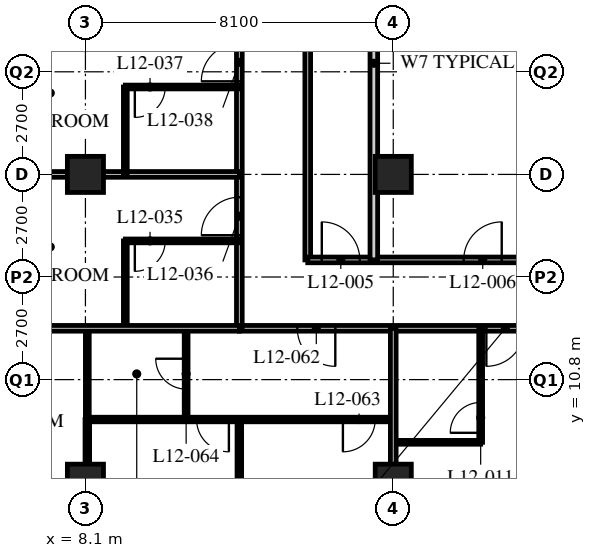
"""IFC4 building model, lengths in metres.
Left out: names, types, materials, properties, quantities, classifications, styles, units other than length and angle.
Written with IfcOpenShell. Run it as: python <this file> out.ifc"""

import sys

from ifc_helpers import new_model, si_unit, direction, frame, frame_2d, origin, origin_2d, place, context, subcontext, project, spatial, rectangle, hollow_rectangle, extrude, element, fill, save


model = new_model("IFC4")
c1 = context("Model", 3, precision=1e-05, world=origin(), true_north=direction((0.0, 1.0)))
c2 = subcontext(c1, "Body", "Model", "MODEL_VIEW")
j1 = project(units=[si_unit("LENGTHUNIT", "METRE"), si_unit("PLANEANGLEUNIT", "RADIAN")], contexts=[c1])
p1 = place(None, origin())
s1 = spatial("IfcSite", under=j1, at=p1, CompositionType="ELEMENT")
p2 = place(p1, origin())
s2 = spatial("IfcBuilding", under=s1, at=p2, CompositionType="ELEMENT")
p3 = place(p2, frame((0.0, 0.0, 53.4)))
s3 = spatial("IfcBuildingStorey", under=s2, at=p3, CompositionType="ELEMENT", Elevation=53.4)
for number, where, z_axis, x_axis in (
    (1, (8.1, 8.1, 0.0), (0.0, 0.0, 1.0), (1.0, 0.0, 0.0)),
    (2, (8.1, 16.2, 0.0), (0.0, 0.0, 1.0), (1.0, 0.0, 0.0)),
    (3, (16.2, 8.1, 0.0), (0.0, 0.0, 1.0), (1.0, 0.0, 0.0)),
    (4, (16.2, 16.2, 0.0), (0.0, 0.0, 1.0), (1.0, 0.0, 0.0)),
):
    element("IfcColumn", number, at=place(p3, frame(where, z_axis=z_axis, x_axis=x_axis)), inside=s3, PredefinedType="COLUMN", context=c2, shape_type="SweptSolid", body=[
        extrude(hollow_rectangle(XDim=0.95, YDim=0.95, WallThickness=0.095, at=origin_2d()), origin(), (0.0, 0.0, 1.0), 3.4),
    ])
p4 = place(p3, frame((12.15, 12.15, 0.0), z_axis=(0.0, 0.0, 1.0), x_axis=(1.0, 0.0, 0.0)))
e5 = element("IfcWall", 5, at=p4, inside=s3, PredefinedType="PARTITIONING", context=c2, shape_type="SweptSolid", body=[
    extrude(rectangle(XDim=32.4, YDim=0.15, at=frame_2d((16.2, 0.0))), origin(), (0.0, 0.0, 1.0), 3.19),
])
p5 = place(p4, frame((6.5, 0.0, 0.0)))
e6 = element("IfcOpeningElement", 6, at=p5, cuts=e5, PredefinedType="OPENING", context=c2, shape_type="SweptSolid", body=[
    extrude(rectangle(XDim=1.0, YDim=2.1, at=frame_2d((0.5, 1.05))), frame((0.0, 0.085, 0.0), z_axis=(0.0, -1.0, 0.0), x_axis=(1.0, 0.0, 0.0)), (0.0, 0.0, 1.0), 0.17),
])
p6 = place(p4, frame((8.4, 0.0, 0.0)))
e7 = element("IfcOpeningElement", 7, at=p6, cuts=e5, PredefinedType="OPENING", context=c2, shape_type="SweptSolid", body=[
    extrude(rectangle(XDim=1.0, YDim=2.1, at=frame_2d((0.5, 1.05))), frame((0.0, 0.085, 0.0), z_axis=(0.0, -1.0, 0.0), x_axis=(1.0, 0.0, 0.0)), (0.0, 0.0, 1.0), 0.17),
])
p7 = place(p4, frame((14.6, 0.0, 0.0)))
e8 = element("IfcOpeningElement", 8, at=p7, cuts=e5, PredefinedType="OPENING", context=c2, shape_type="SweptSolid", body=[
    extrude(rectangle(XDim=1.0, YDim=2.1, at=frame_2d((0.5, 1.05))), frame((0.0, 0.085, 0.0), z_axis=(0.0, -1.0, 0.0), x_axis=(1.0, 0.0, 0.0)), (0.0, 0.0, 1.0), 0.17),
])
p8 = place(p4, frame((18.65, 0.0, 0.0)))
e9 = element("IfcOpeningElement", 9, at=p8, cuts=e5, PredefinedType="OPENING", context=c2, shape_type="SweptSolid", body=[
    extrude(rectangle(XDim=1.0, YDim=2.1, at=frame_2d((0.5, 1.05))), frame((0.0, 0.085, 0.0), z_axis=(0.0, -1.0, 0.0), x_axis=(1.0, 0.0, 0.0)), (0.0, 0.0, 1.0), 0.17),
])
p9 = place(p4, frame((20.55, 0.0, 0.0)))
e10 = element("IfcOpeningElement", 10, at=p9, cuts=e5, PredefinedType="OPENING", context=c2, shape_type="SweptSolid", body=[
    extrude(rectangle(XDim=1.0, YDim=2.1, at=frame_2d((0.5, 1.05))), frame((0.0, 0.085, 0.0), z_axis=(0.0, -1.0, 0.0), x_axis=(1.0, 0.0, 0.0)), (0.0, 0.0, 1.0), 0.17),
])
p10 = place(p4, frame((26.75, 0.0, 0.0)))
e11 = element("IfcOpeningElement", 11, at=p10, cuts=e5, PredefinedType="OPENING", context=c2, shape_type="SweptSolid", body=[
    extrude(rectangle(XDim=1.0, YDim=2.1, at=frame_2d((0.5, 1.05))), frame((0.0, 0.085, 0.0), z_axis=(0.0, -1.0, 0.0), x_axis=(1.0, 0.0, 0.0)), (0.0, 0.0, 1.0), 0.17),
])
p11 = place(p4, frame((1.525, 0.0, 0.0)))
e12 = element("IfcOpeningElement", 12, at=p11, cuts=e5, PredefinedType="OPENING", context=c2, shape_type="SweptSolid", body=[
    extrude(rectangle(XDim=1.0, YDim=2.1, at=frame_2d((0.5, 1.05))), frame((0.0, 0.085, 0.0), z_axis=(0.0, -1.0, 0.0), x_axis=(1.0, 0.0, 0.0)), (0.0, 0.0, 1.0), 0.17),
])
p12 = place(p4, frame((29.875, 0.0, 0.0)))
e13 = element("IfcOpeningElement", 13, at=p12, cuts=e5, PredefinedType="OPENING", context=c2, shape_type="SweptSolid", body=[
    extrude(rectangle(XDim=1.0, YDim=2.1, at=frame_2d((0.5, 1.05))), frame((0.0, 0.085, 0.0), z_axis=(0.0, -1.0, 0.0), x_axis=(1.0, 0.0, 0.0)), (0.0, 0.0, 1.0), 0.17),
])
p13 = place(p3, frame((12.15, 12.15, 0.0), z_axis=(0.0, 0.0, 1.0), x_axis=(0.0, 1.0, 0.0)))
e14 = element("IfcWall", 14, at=p13, inside=s3, PredefinedType="PARTITIONING", context=c2, shape_type="SweptSolid", body=[
    extrude(rectangle(XDim=30.15, YDim=0.15, at=frame_2d((15.075, 0.0))), origin(), (0.0, 0.0, 1.0), 3.19),
])
p14 = place(p13, frame((2.45, 0.0, 0.0)))
e15 = element("IfcOpeningElement", 15, at=p14, cuts=e14, PredefinedType="OPENING", context=c2, shape_type="SweptSolid", body=[
    extrude(rectangle(XDim=1.0, YDim=2.1, at=frame_2d((0.5, 1.05))), frame((0.0, 0.085, 0.0), z_axis=(0.0, -1.0, 0.0), x_axis=(1.0, 0.0, 0.0)), (0.0, 0.0, 1.0), 0.17),
])
p15 = place(p13, frame((6.5, 0.0, 0.0)))
e16 = element("IfcOpeningElement", 16, at=p15, cuts=e14, PredefinedType="OPENING", context=c2, shape_type="SweptSolid", body=[
    extrude(rectangle(XDim=1.0, YDim=2.1, at=frame_2d((0.5, 1.05))), frame((0.0, 0.085, 0.0), z_axis=(0.0, -1.0, 0.0), x_axis=(1.0, 0.0, 0.0)), (0.0, 0.0, 1.0), 0.17),
])
p16 = place(p13, frame((10.55, 0.0, 0.0)))
e17 = element("IfcOpeningElement", 17, at=p16, cuts=e14, PredefinedType="OPENING", context=c2, shape_type="SweptSolid", body=[
    extrude(rectangle(XDim=1.0, YDim=2.1, at=frame_2d((0.5, 1.05))), frame((0.0, 0.085, 0.0), z_axis=(0.0, -1.0, 0.0), x_axis=(1.0, 0.0, 0.0)), (0.0, 0.0, 1.0), 0.17),
])
p17 = place(p13, frame((14.6, 0.0, 0.0)))
e18 = element("IfcOpeningElement", 18, at=p17, cuts=e14, PredefinedType="OPENING", context=c2, shape_type="SweptSolid", body=[
    extrude(rectangle(XDim=1.0, YDim=2.1, at=frame_2d((0.5, 1.05))), frame((0.0, 0.085, 0.0), z_axis=(0.0, -1.0, 0.0), x_axis=(1.0, 0.0, 0.0)), (0.0, 0.0, 1.0), 0.17),
])
p18 = place(p13, frame((21.65, 0.0, 0.0)))
e19 = element("IfcOpeningElement", 19, at=p18, cuts=e14, PredefinedType="OPENING", context=c2, shape_type="SweptSolid", body=[
    extrude(rectangle(XDim=1.0, YDim=2.1, at=frame_2d((0.5, 1.05))), frame((0.0, 0.085, 0.0), z_axis=(0.0, -1.0, 0.0), x_axis=(1.0, 0.0, 0.0)), (0.0, 0.0, 1.0), 0.17),
])
p19 = place(p13, frame((26.7, 0.0, 0.0)))
e20 = element("IfcOpeningElement", 20, at=p19, cuts=e14, PredefinedType="OPENING", context=c2, shape_type="SweptSolid", body=[
    extrude(rectangle(XDim=1.0, YDim=2.1, at=frame_2d((0.5, 1.05))), frame((0.0, 0.085, 0.0), z_axis=(0.0, -1.0, 0.0), x_axis=(1.0, 0.0, 0.0)), (0.0, 0.0, 1.0), 0.17),
])
p20 = place(p3, frame((13.95, 40.5, 0.0), z_axis=(0.0, 0.0, 1.0), x_axis=(0.0, -1.0, 0.0)))
e21 = element("IfcWall", 21, at=p20, inside=s3, PredefinedType="PARTITIONING", context=c2, shape_type="SweptSolid", body=[
    extrude(rectangle(XDim=26.55, YDim=0.15, at=frame_2d((13.275, 0.0))), origin(), (0.0, 0.0, 1.0), 3.19),
])
p21 = place(p20, frame((11.65, 0.0, 0.0)))
e22 = element("IfcOpeningElement", 22, at=p21, cuts=e21, PredefinedType="OPENING", context=c2, shape_type="SweptSolid", body=[
    extrude(rectangle(XDim=1.0, YDim=2.1, at=frame_2d((0.5, 1.05))), frame((0.0, 0.085, 0.0), z_axis=(0.0, -1.0, 0.0), x_axis=(1.0, 0.0, 0.0)), (0.0, 0.0, 1.0), 0.17),
])
p22 = place(p20, frame((3.55, 0.0, 0.0)))
e23 = element("IfcOpeningElement", 23, at=p22, cuts=e21, PredefinedType="OPENING", context=c2, shape_type="SweptSolid", body=[
    extrude(rectangle(XDim=1.0, YDim=2.1, at=frame_2d((0.5, 1.05))), frame((0.0, 0.085, 0.0), z_axis=(0.0, -1.0, 0.0), x_axis=(1.0, 0.0, 0.0)), (0.0, 0.0, 1.0), 0.17),
])
p23 = place(p3, frame((13.95, 13.95, 0.0), z_axis=(0.0, 0.0, 1.0), x_axis=(1.0, 0.0, 0.0)))
e24 = element("IfcWall", 24, at=p23, inside=s3, PredefinedType="PARTITIONING", context=c2, shape_type="SweptSolid", body=[
    extrude(rectangle(XDim=13.19, YDim=0.15, at=frame_2d((6.595, 0.0))), origin(), (0.0, 0.0, 1.0), 3.19),
])
p24 = place(p23, frame((0.37, 0.0, 0.0)))
e25 = element("IfcOpeningElement", 25, at=p24, cuts=e24, PredefinedType="OPENING", context=c2, shape_type="SweptSolid", body=[
    extrude(rectangle(XDim=1.0, YDim=2.1, at=frame_2d((0.5, 1.05))), frame((0.0, 0.085, 0.0), z_axis=(0.0, -1.0, 0.0), x_axis=(1.0, 0.0, 0.0)), (0.0, 0.0, 1.0), 0.17),
])
p25 = place(p23, frame((4.104, 0.0, 0.0)))
e26 = element("IfcOpeningElement", 26, at=p25, cuts=e24, PredefinedType="OPENING", context=c2, shape_type="SweptSolid", body=[
    extrude(rectangle(XDim=1.0, YDim=2.1, at=frame_2d((0.5, 1.05))), frame((0.0, 0.085, 0.0), z_axis=(0.0, -1.0, 0.0), x_axis=(1.0, 0.0, 0.0)), (0.0, 0.0, 1.0), 0.17),
])
p26 = place(p23, frame((9.835, 0.0, 0.0)))
e27 = element("IfcOpeningElement", 27, at=p26, cuts=e24, PredefinedType="OPENING", context=c2, shape_type="SweptSolid", body=[
    extrude(rectangle(XDim=1.0, YDim=2.1, at=frame_2d((0.5, 1.05))), frame((0.0, 0.085, 0.0), z_axis=(0.0, -1.0, 0.0), x_axis=(1.0, 0.0, 0.0)), (0.0, 0.0, 1.0), 0.17),
])
p27 = place(p3, frame((15.689, 13.95, 0.0), z_axis=(0.0, 0.0, 1.0), x_axis=(0.0, 1.0, 0.0)))
e28 = element("IfcWall", 28, at=p27, inside=s3, PredefinedType="SOLIDWALL", context=c2, shape_type="SweptSolid", body=[
    extrude(rectangle(XDim=10.35, YDim=0.2, at=frame_2d((5.175, 0.0))), origin(), (0.0, 0.0, 1.0), 3.19),
])
p28 = place(p3, frame((16.2, 9.15, 0.0), z_axis=(0.0, 0.0, 1.0), x_axis=(1.0, 0.0, 0.0)))
e29 = element("IfcWall", 29, at=p28, inside=s3, PredefinedType="PARTITIONING", context=c2, shape_type="SweptSolid", body=[
    extrude(rectangle(XDim=2.3, YDim=0.1, at=frame_2d((1.15, 0.0))), origin(), (0.0, 0.0, 1.0), 3.19),
])
p29 = place(p3, frame((18.5, 12.15, 0.0), z_axis=(0.0, 0.0, 1.0), x_axis=(0.0, -1.0, 0.0)))
e30 = element("IfcWall", 30, at=p29, inside=s3, PredefinedType="PARTITIONING", context=c2, shape_type="SweptSolid", body=[
    extrude(rectangle(XDim=3.0, YDim=0.1, at=frame_2d((1.5, 0.0))), origin(), (0.0, 0.0, 1.0), 3.19),
])
p30 = place(p29, frame((1.95, 0.0, 0.0)))
e31 = element("IfcOpeningElement", 31, at=p30, cuts=e30, PredefinedType="OPENING", context=c2, shape_type="SweptSolid", body=[
    extrude(rectangle(XDim=0.8, YDim=2.1, at=frame_2d((0.4, 1.05))), frame((0.0, 0.06, 0.0), z_axis=(0.0, -1.0, 0.0), x_axis=(1.0, 0.0, 0.0)), (0.0, 0.0, 1.0), 0.12),
])
p31 = place(p3, frame((9.15, 12.15, 0.0), z_axis=(0.0, 0.0, 1.0), x_axis=(0.0, 1.0, 0.0)))
e32 = element("IfcWall", 32, at=p31, inside=s3, PredefinedType="PARTITIONING", context=c2, shape_type="SweptSolid", body=[
    extrude(rectangle(XDim=2.3, YDim=0.1, at=frame_2d((1.15, 0.0))), origin(), (0.0, 0.0, 1.0), 3.19),
])
p32 = place(p3, frame((12.15, 14.45, 0.0), z_axis=(0.0, 0.0, 1.0), x_axis=(-1.0, 0.0, 0.0)))
e33 = element("IfcWall", 33, at=p32, inside=s3, PredefinedType="PARTITIONING", context=c2, shape_type="SweptSolid", body=[
    extrude(rectangle(XDim=3.0, YDim=0.1, at=frame_2d((1.5, 0.0))), origin(), (0.0, 0.0, 1.0), 3.19),
])
p33 = place(p32, frame((1.95, 0.0, 0.0)))
e34 = element("IfcOpeningElement", 34, at=p33, cuts=e33, PredefinedType="OPENING", context=c2, shape_type="SweptSolid", body=[
    extrude(rectangle(XDim=0.8, YDim=2.1, at=frame_2d((0.4, 1.05))), frame((0.0, 0.06, 0.0), z_axis=(0.0, -1.0, 0.0), x_axis=(1.0, 0.0, 0.0)), (0.0, 0.0, 1.0), 0.12),
])
p34 = place(p3, frame((12.15, 16.2, 0.0), z_axis=(0.0, 0.0, 1.0), x_axis=(-1.0, 0.0, 0.0)))
e35 = element("IfcWall", 35, at=p34, inside=s3, PredefinedType="PARTITIONING", context=c2, shape_type="SweptSolid", body=[
    extrude(rectangle(XDim=11.85, YDim=0.15, at=frame_2d((5.925, 0.0))), origin(), (0.0, 0.0, 1.0), 2.578),
])
p35 = place(p3, frame((9.15, 16.2, 0.0), z_axis=(0.0, 0.0, 1.0), x_axis=(0.0, 1.0, 0.0)))
e36 = element("IfcWall", 36, at=p35, inside=s3, PredefinedType="PARTITIONING", context=c2, shape_type="SweptSolid", body=[
    extrude(rectangle(XDim=2.3, YDim=0.1, at=frame_2d((1.15, 0.0))), origin(), (0.0, 0.0, 1.0), 3.19),
])
p36 = place(p3, frame((12.15, 18.5, 0.0), z_axis=(0.0, 0.0, 1.0), x_axis=(-1.0, 0.0, 0.0)))
e37 = element("IfcWall", 37, at=p36, inside=s3, PredefinedType="PARTITIONING", context=c2, shape_type="SweptSolid", body=[
    extrude(rectangle(XDim=3.0, YDim=0.1, at=frame_2d((1.5, 0.0))), origin(), (0.0, 0.0, 1.0), 3.19),
])
p37 = place(p36, frame((1.95, 0.0, 0.0)))
e38 = element("IfcOpeningElement", 38, at=p37, cuts=e37, PredefinedType="OPENING", context=c2, shape_type="SweptSolid", body=[
    extrude(rectangle(XDim=0.8, YDim=2.1, at=frame_2d((0.4, 1.05))), frame((0.0, 0.06, 0.0), z_axis=(0.0, -1.0, 0.0), x_axis=(1.0, 0.0, 0.0)), (0.0, 0.0, 1.0), 0.12),
])
p38 = place(p3, frame((10.75, 12.15, 0.0), z_axis=(0.0, 0.0, 1.0), x_axis=(0.0, -1.0, 0.0)))
e39 = element("IfcWall", 39, at=p38, inside=s3, PredefinedType="PARTITIONING", context=c2, shape_type="SweptSolid", body=[
    extrude(rectangle(XDim=2.4, YDim=0.1, at=frame_2d((1.2, 0.0))), origin(), (0.0, 0.0, 1.0), 3.19),
])
p39 = place(p38, frame((0.8, 0.0, 0.0)))
e40 = element("IfcOpeningElement", 40, at=p39, cuts=e39, PredefinedType="OPENING", context=c2, shape_type="SweptSolid", body=[
    extrude(rectangle(XDim=0.8, YDim=2.1, at=frame_2d((0.4, 1.05))), frame((0.0, 0.06, 0.0), z_axis=(0.0, -1.0, 0.0), x_axis=(1.0, 0.0, 0.0)), (0.0, 0.0, 1.0), 0.12),
])
p40 = place(p3, frame((8.15, 12.15, 0.0), z_axis=(0.0, 0.0, 1.0), x_axis=(0.0, -1.0, 0.0)))
e41 = element("IfcWall", 41, at=p40, inside=s3, PredefinedType="PARTITIONING", context=c2, shape_type="SweptSolid", body=[
    extrude(rectangle(XDim=2.4, YDim=0.1, at=frame_2d((1.2, 0.0))), origin(), (0.0, 0.0, 1.0), 2.578),
])
p41 = place(p3, frame((8.15, 9.75, 0.0), z_axis=(0.0, 0.0, 1.0), x_axis=(1.0, 0.0, 0.0)))
e42 = element("IfcWall", 42, at=p41, inside=s3, PredefinedType="PARTITIONING", context=c2, shape_type="SweptSolid", body=[
    extrude(rectangle(XDim=8.05, YDim=0.12, at=frame_2d((4.025, 0.0))), origin(), (0.0, 0.0, 1.0), 3.19),
])
p42 = place(p41, frame((6.725, 0.0, 0.0)))
e43 = element("IfcOpeningElement", 43, at=p42, cuts=e42, PredefinedType="OPENING", context=c2, shape_type="SweptSolid", body=[
    extrude(rectangle(XDim=0.85, YDim=2.1, at=frame_2d((0.425, 1.05))), frame((0.0, 0.07, 0.0), z_axis=(0.0, -1.0, 0.0), x_axis=(1.0, 0.0, 0.0)), (0.0, 0.0, 1.0), 0.14),
])
p43 = place(p41, frame((2.875, 0.0, 0.0)))
e44 = element("IfcOpeningElement", 44, at=p43, cuts=e42, PredefinedType="OPENING", context=c2, shape_type="SweptSolid", body=[
    extrude(rectangle(XDim=0.85, YDim=2.1, at=frame_2d((0.425, 1.05))), frame((0.0, 0.07, 0.0), z_axis=(0.0, -1.0, 0.0), x_axis=(1.0, 0.0, 0.0)), (0.0, 0.0, 1.0), 0.14),
])
p44 = place(p3, frame((12.15, 9.75, 0.0), z_axis=(0.0, 0.0, 1.0), x_axis=(0.0, -1.0, 0.0)))
e45 = element("IfcWall", 45, at=p44, inside=s3, PredefinedType="PARTITIONING", context=c2, shape_type="SweptSolid", body=[
    extrude(rectangle(XDim=9.45, YDim=0.12, at=frame_2d((4.725, 0.0))), origin(), (0.0, 0.0, 1.0), 3.19),
])
p45 = place(p3, frame((0.3, 12.15, 0.0), z_axis=(0.0, 0.0, 1.0), x_axis=(1.0, 0.0, 0.0)))
e46 = element("IfcWall", 46, at=p45, inside=s3, PredefinedType="PARTITIONING", context=c2, shape_type="SweptSolid", body=[
    extrude(rectangle(XDim=11.85, YDim=0.15, at=frame_2d((5.925, 0.0))), origin(), (0.0, 0.0, 1.0), 3.19),
])
p46 = place(p3, frame((16.2, 12.15, 0.0), z_axis=(0.0, 0.0, 1.0), x_axis=(0.0, -1.0, 0.0)))
e47 = element("IfcWall", 47, at=p46, inside=s3, PredefinedType="PARTITIONING", context=c2, shape_type="SweptSolid", body=[
    extrude(rectangle(XDim=11.85, YDim=0.15, at=frame_2d((5.925, 0.0))), origin(), (0.0, 0.0, 1.0), 2.578),
])
p47 = place(p3, frame((8.15, 9.75, 0.0), z_axis=(0.0, 0.0, 1.0), x_axis=(0.0, -1.0, 0.0)))
e48 = element("IfcWall", 48, at=p47, inside=s3, PredefinedType="PARTITIONING", context=c2, shape_type="SweptSolid", body=[
    extrude(rectangle(XDim=1.175, YDim=0.12, at=frame_2d((0.587, 0.0))), origin(), (0.0, 0.0, 1.0), 2.578),
])
p48 = place(p24, origin())
e49 = element("IfcDoor", 49, at=p48, inside=s3, OperationType="SINGLE_SWING_LEFT", PredefinedType="DOOR", context=c2, shape_type="SweptSolid", body=[
    extrude(rectangle(XDim=1.0, YDim=2.1, at=frame_2d((0.5, 1.05))), frame((0.0, 0.025, 0.0), z_axis=(0.0, -1.0, 0.0), x_axis=(1.0, 0.0, 0.0)), (0.0, 0.0, 1.0), 0.05),
])
fill(e25, e49)
p49 = place(p25, origin())
e50 = element("IfcDoor", 50, at=p49, inside=s3, OperationType="SINGLE_SWING_RIGHT", PredefinedType="DOOR", context=c2, shape_type="SweptSolid", body=[
    extrude(rectangle(XDim=1.0, YDim=2.1, at=frame_2d((0.5, 1.05))), frame((0.0, 0.025, 0.0), z_axis=(0.0, -1.0, 0.0), x_axis=(1.0, 0.0, 0.0)), (0.0, 0.0, 1.0), 0.05),
])
fill(e26, e50)
p50 = place(p30, origin())
e51 = element("IfcDoor", 51, at=p50, inside=s3, OperationType="SINGLE_SWING_LEFT", PredefinedType="DOOR", context=c2, shape_type="SweptSolid", body=[
    extrude(rectangle(XDim=0.8, YDim=2.1, at=frame_2d((0.4, 1.05))), frame((0.0, 0.025, 0.0), z_axis=(0.0, -1.0, 0.0), x_axis=(1.0, 0.0, 0.0)), (0.0, 0.0, 1.0), 0.05),
])
fill(e31, e51)
p51 = place(p5, origin())
e52 = element("IfcDoor", 52, at=p51, inside=s3, OperationType="SINGLE_SWING_RIGHT", PredefinedType="DOOR", context=c2, shape_type="SweptSolid", body=[
    extrude(rectangle(XDim=1.0, YDim=2.1, at=frame_2d((0.5, 1.05))), frame((0.0, 0.025, 0.0), z_axis=(0.0, -1.0, 0.0), x_axis=(1.0, 0.0, 0.0)), (0.0, 0.0, 1.0), 0.05),
])
fill(e6, e52)
p52 = place(p33, origin())
e53 = element("IfcDoor", 53, at=p52, inside=s3, OperationType="SINGLE_SWING_RIGHT", PredefinedType="DOOR", context=c2, shape_type="SweptSolid", body=[
    extrude(rectangle(XDim=0.8, YDim=2.1, at=frame_2d((0.4, 1.05))), frame((0.0, 0.025, 0.0), z_axis=(0.0, -1.0, 0.0), x_axis=(1.0, 0.0, 0.0)), (0.0, 0.0, 1.0), 0.05),
])
fill(e34, e53)
p53 = place(p14, origin())
e54 = element("IfcDoor", 54, at=p53, inside=s3, OperationType="SINGLE_SWING_LEFT", PredefinedType="DOOR", context=c2, shape_type="SweptSolid", body=[
    extrude(rectangle(XDim=1.0, YDim=2.1, at=frame_2d((0.5, 1.05))), frame((0.0, 0.025, 0.0), z_axis=(0.0, -1.0, 0.0), x_axis=(1.0, 0.0, 0.0)), (0.0, 0.0, 1.0), 0.05),
])
fill(e15, e54)
p54 = place(p37, origin())
e55 = element("IfcDoor", 55, at=p54, inside=s3, OperationType="SINGLE_SWING_RIGHT", PredefinedType="DOOR", context=c2, shape_type="SweptSolid", body=[
    extrude(rectangle(XDim=0.8, YDim=2.1, at=frame_2d((0.4, 1.05))), frame((0.0, 0.025, 0.0), z_axis=(0.0, -1.0, 0.0), x_axis=(1.0, 0.0, 0.0)), (0.0, 0.0, 1.0), 0.05),
])
fill(e38, e55)
p55 = place(p15, origin())
e56 = element("IfcDoor", 56, at=p55, inside=s3, OperationType="SINGLE_SWING_LEFT", PredefinedType="DOOR", context=c2, shape_type="SweptSolid", body=[
    extrude(rectangle(XDim=1.0, YDim=2.1, at=frame_2d((0.5, 1.05))), frame((0.0, 0.025, 0.0), z_axis=(0.0, -1.0, 0.0), x_axis=(1.0, 0.0, 0.0)), (0.0, 0.0, 1.0), 0.05),
])
fill(e16, e56)
p56 = place(p11, origin())
e57 = element("IfcDoor", 57, at=p56, inside=s3, OperationType="SINGLE_SWING_LEFT", PredefinedType="DOOR", context=c2, shape_type="SweptSolid", body=[
    extrude(rectangle(XDim=1.0, YDim=2.1, at=frame_2d((0.5, 1.05))), frame((0.0, 0.025, 0.0), z_axis=(0.0, -1.0, 0.0), x_axis=(1.0, 0.0, 0.0)), (0.0, 0.0, 1.0), 0.05),
])
fill(e12, e57)
p57 = place(p42, origin())
e58 = element("IfcDoor", 58, at=p57, inside=s3, OperationType="SINGLE_SWING_RIGHT", PredefinedType="DOOR", context=c2, shape_type="SweptSolid", body=[
    extrude(rectangle(XDim=0.85, YDim=2.1, at=frame_2d((0.425, 1.05))), frame((0.0, 0.025, 0.0), z_axis=(0.0, -1.0, 0.0), x_axis=(1.0, 0.0, 0.0)), (0.0, 0.0, 1.0), 0.05),
])
fill(e43, e58)
p58 = place(p39, origin())
e59 = element("IfcDoor", 59, at=p58, inside=s3, OperationType="SINGLE_SWING_RIGHT", PredefinedType="DOOR", context=c2, shape_type="SweptSolid", body=[
    extrude(rectangle(XDim=0.8, YDim=2.1, at=frame_2d((0.4, 1.05))), frame((0.0, 0.025, 0.0), z_axis=(0.0, -1.0, 0.0), x_axis=(1.0, 0.0, 0.0)), (0.0, 0.0, 1.0), 0.05),
])
fill(e40, e59)
p59 = place(p43, origin())
e60 = element("IfcDoor", 60, at=p59, inside=s3, OperationType="SINGLE_SWING_LEFT", PredefinedType="DOOR", context=c2, shape_type="SweptSolid", body=[
    extrude(rectangle(XDim=0.85, YDim=2.1, at=frame_2d((0.425, 1.05))), frame((0.0, 0.025, 0.0), z_axis=(0.0, -1.0, 0.0), x_axis=(1.0, 0.0, 0.0)), (0.0, 0.0, 1.0), 0.05),
])
fill(e44, e60)
save(model, sys.argv[1])
